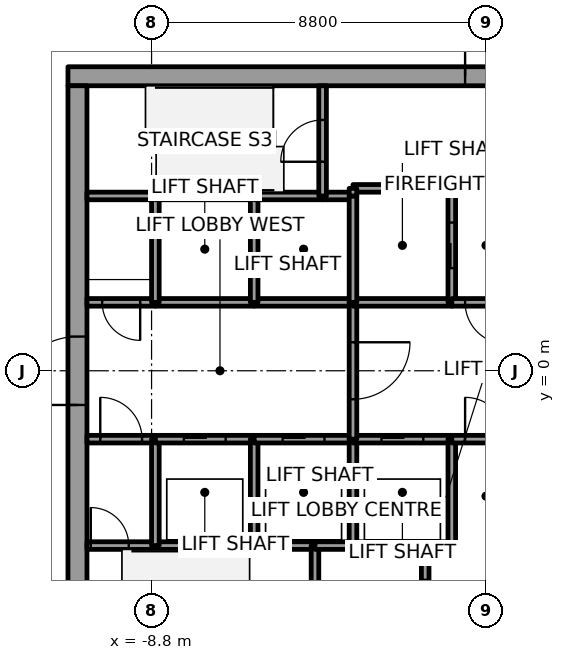
"""IFC4 building model, lengths in metres.
Left out: names, types, materials, properties, quantities, classifications, styles, units other than length and angle.
Written with IfcOpenShell. Run it as: python <this file> out.ifc"""

import sys

from ifc_helpers import new_model, si_unit, direction, frame, frame_2d, origin, place, context, subcontext, project, spatial, rectangle, extrude, element, fill, save


model = new_model("IFC4")
c1 = context("Model", 3, precision=1e-05, world=origin(), true_north=direction((0.0, 1.0)))
c2 = subcontext(c1, "Body", "Model", "MODEL_VIEW")
j1 = project(units=[si_unit("LENGTHUNIT", "METRE"), si_unit("PLANEANGLEUNIT", "RADIAN")], contexts=[c1])
p1 = place(None, origin())
s1 = spatial("IfcSite", under=j1, at=p1, CompositionType="ELEMENT")
p2 = place(p1, origin())
s2 = spatial("IfcBuilding", under=s1, at=p2, CompositionType="ELEMENT")
p3 = place(p2, frame((0.0, 0.0, 173.8)))
s3 = spatial("IfcBuildingStorey", under=s2, at=p3, CompositionType="ELEMENT", Elevation=173.8)
p4 = place(p3, frame((-11.0, 7.75, 0.0), z_axis=(0.0, 0.0, 1.0), x_axis=(1.0, 0.0, 0.0)))
e1 = element("IfcWall", 1, at=p4, inside=s3, PredefinedType="SHEAR", context=c2, shape_type="SweptSolid", body=[
    extrude(rectangle(XDim=22.0, YDim=0.5, at=frame_2d((11.0, 0.0))), origin(), (0.0, 0.0, 1.0), 4.0),
])
p5 = place(p4, frame((10.45, 0.0, 0.0)))
e2 = element("IfcOpeningElement", 2, at=p5, cuts=e1, PredefinedType="OPENING", context=c2, shape_type="SweptSolid", body=[
    extrude(rectangle(XDim=1.1, YDim=2.1, at=frame_2d((0.55, 1.05))), frame((0.0, 0.25, 0.0), z_axis=(0.0, -1.0, 0.0), x_axis=(1.0, 0.0, 0.0)), (0.0, 0.0, 1.0), 0.5),
])
p6 = place(p3, frame((-10.75, -7.5, 0.0), z_axis=(0.0, 0.0, 1.0), x_axis=(0.0, 1.0, 0.0)))
e3 = element("IfcWall", 3, at=p6, inside=s3, PredefinedType="SHEAR", context=c2, shape_type="SweptSolid", body=[
    extrude(rectangle(XDim=15.0, YDim=0.5, at=frame_2d((7.5, 0.0))), origin(), (0.0, 0.0, 1.0), 4.0),
])
p7 = place(p6, frame((6.6, 0.0, 0.0)))
e4 = element("IfcOpeningElement", 4, at=p7, cuts=e3, PredefinedType="OPENING", context=c2, shape_type="SweptSolid", body=[
    extrude(rectangle(XDim=1.8, YDim=2.1, at=frame_2d((0.9, 1.05))), frame((0.0, 0.25, 0.0), z_axis=(0.0, -1.0, 0.0), x_axis=(1.0, 0.0, 0.0)), (0.0, 0.0, 1.0), 0.5),
])
p8 = place(p3, frame((-10.5, -4.6, 0.0), z_axis=(0.0, 0.0, 1.0), x_axis=(1.0, 0.0, 0.0)))
e5 = element("IfcWall", 5, at=p8, inside=s3, PredefinedType="SOLIDWALL", context=c2, shape_type="SweptSolid", body=[
    extrude(rectangle(XDim=1.8, YDim=0.2, at=frame_2d((0.9, 0.0))), origin(), (0.0, 0.0, 1.0), 3.85),
])
p9 = place(p8, frame((0.1, 0.0, 0.0)))
e6 = element("IfcOpeningElement", 6, at=p9, cuts=e5, PredefinedType="OPENING", context=c2, shape_type="SweptSolid", body=[
    extrude(rectangle(XDim=1.0, YDim=2.1, at=frame_2d((0.5, 1.05))), frame((0.0, 0.1, 0.0), z_axis=(0.0, -1.0, 0.0), x_axis=(1.0, 0.0, 0.0)), (0.0, 0.0, 1.0), 0.2),
])
p10 = place(p3, frame((-10.5, -1.8, 0.0), z_axis=(0.0, 0.0, 1.0), x_axis=(1.0, 0.0, 0.0)))
e7 = element("IfcWall", 7, at=p10, inside=s3, PredefinedType="SOLIDWALL", context=c2, shape_type="SweptSolid", body=[
    extrude(rectangle(XDim=1.8, YDim=0.2, at=frame_2d((0.9, 0.0))), origin(), (0.0, 0.0, 1.0), 3.85),
])
p11 = place(p10, frame((0.35, 0.0, 0.0)))
e8 = element("IfcOpeningElement", 8, at=p11, cuts=e7, PredefinedType="OPENING", context=c2, shape_type="SweptSolid", body=[
    extrude(rectangle(XDim=1.1, YDim=2.1, at=frame_2d((0.55, 1.05))), frame((0.0, 0.1, 0.0), z_axis=(0.0, -1.0, 0.0), x_axis=(1.0, 0.0, 0.0)), (0.0, 0.0, 1.0), 0.2),
])
p12 = place(p3, frame((-8.7, 1.8, 0.0), z_axis=(0.0, 0.0, 1.0), x_axis=(-1.0, 0.0, 0.0)))
e9 = element("IfcWall", 9, at=p12, inside=s3, PredefinedType="SOLIDWALL", context=c2, shape_type="SweptSolid", body=[
    extrude(rectangle(XDim=1.8, YDim=0.2, at=frame_2d((0.9, 0.0))), origin(), (0.0, 0.0, 1.0), 3.85),
])
p13 = place(p12, frame((0.4, 0.0, 0.0)))
e10 = element("IfcOpeningElement", 10, at=p13, cuts=e9, PredefinedType="OPENING", context=c2, shape_type="SweptSolid", body=[
    extrude(rectangle(XDim=1.0, YDim=2.1, at=frame_2d((0.5, 1.05))), frame((0.0, 0.1, 0.0), z_axis=(0.0, -1.0, 0.0), x_axis=(1.0, 0.0, 0.0)), (0.0, 0.0, 1.0), 0.2),
])
p14 = place(p3, frame((-8.7, 4.6, 0.0), z_axis=(0.0, 0.0, 1.0), x_axis=(-1.0, 0.0, 0.0)))
e11 = element("IfcWall", 11, at=p14, inside=s3, PredefinedType="SOLIDWALL", context=c2, shape_type="SweptSolid", body=[
    extrude(rectangle(XDim=1.8, YDim=0.2, at=frame_2d((0.9, 0.0))), origin(), (0.0, 0.0, 1.0), 3.85),
])
p15 = place(p3, frame((-8.7, -4.6, 0.0), z_axis=(0.0, 0.0, 1.0), x_axis=(1.0, 0.0, 0.0)))
e12 = element("IfcWall", 12, at=p15, inside=s3, PredefinedType="SOLIDWALL", context=c2, shape_type="SweptSolid", body=[
    extrude(rectangle(XDim=2.6, YDim=0.2, at=frame_2d((1.3, 0.0))), origin(), (0.0, 0.0, 1.0), 3.85),
])
p16 = place(p3, frame((-8.7, -4.6, 0.0), z_axis=(0.0, 0.0, 1.0), x_axis=(0.0, 1.0, 0.0)))
e13 = element("IfcWall", 13, at=p16, inside=s3, PredefinedType="SOLIDWALL", context=c2, shape_type="SweptSolid", body=[
    extrude(rectangle(XDim=2.8, YDim=0.2, at=frame_2d((1.4, 0.0))), origin(), (0.0, 0.0, 1.0), 3.85),
])
p17 = place(p3, frame((-8.7, -1.8, 0.0), z_axis=(0.0, 0.0, 1.0), x_axis=(1.0, 0.0, 0.0)))
e14 = element("IfcWall", 14, at=p17, inside=s3, PredefinedType="SOLIDWALL", context=c2, shape_type="SweptSolid", body=[
    extrude(rectangle(XDim=2.6, YDim=0.2, at=frame_2d((1.3, 0.0))), origin(), (0.0, 0.0, 1.0), 3.85),
])
p18 = place(p17, frame((0.75, 0.0, 0.0)))
e15 = element("IfcOpeningElement", 15, at=p18, cuts=e14, PredefinedType="OPENING", context=c2, shape_type="SweptSolid", body=[
    extrude(rectangle(XDim=1.1, YDim=2.1, at=frame_2d((0.55, 1.05))), frame((0.0, 0.1, 0.0), z_axis=(0.0, -1.0, 0.0), x_axis=(1.0, 0.0, 0.0)), (0.0, 0.0, 1.0), 0.2),
])
p19 = place(p3, frame((-6.1, 1.8, 0.0), z_axis=(0.0, 0.0, 1.0), x_axis=(-1.0, 0.0, 0.0)))
e16 = element("IfcWall", 16, at=p19, inside=s3, PredefinedType="SOLIDWALL", context=c2, shape_type="SweptSolid", body=[
    extrude(rectangle(XDim=2.6, YDim=0.2, at=frame_2d((1.3, 0.0))), origin(), (0.0, 0.0, 1.0), 3.85),
])
p20 = place(p3, frame((-8.7, 1.8, 0.0), z_axis=(0.0, 0.0, 1.0), x_axis=(0.0, 1.0, 0.0)))
e17 = element("IfcWall", 17, at=p20, inside=s3, PredefinedType="SOLIDWALL", context=c2, shape_type="SweptSolid", body=[
    extrude(rectangle(XDim=2.8, YDim=0.2, at=frame_2d((1.4, 0.0))), origin(), (0.0, 0.0, 1.0), 3.85),
])
p21 = place(p3, frame((-6.1, 4.6, 0.0), z_axis=(0.0, 0.0, 1.0), x_axis=(-1.0, 0.0, 0.0)))
e18 = element("IfcWall", 18, at=p21, inside=s3, PredefinedType="SOLIDWALL", context=c2, shape_type="SweptSolid", body=[
    extrude(rectangle(XDim=2.6, YDim=0.2, at=frame_2d((1.3, 0.0))), origin(), (0.0, 0.0, 1.0), 3.85),
])
p22 = place(p3, frame((-6.1, -4.6, 0.0), z_axis=(0.0, 0.0, 1.0), x_axis=(1.0, 0.0, 0.0)))
e19 = element("IfcWall", 19, at=p22, inside=s3, PredefinedType="SOLIDWALL", context=c2, shape_type="SweptSolid", body=[
    extrude(rectangle(XDim=1.6, YDim=0.2, at=frame_2d((0.8, 0.0))), origin(), (0.0, 0.0, 1.0), 3.85),
])
p23 = place(p3, frame((-6.1, -4.6, 0.0), z_axis=(0.0, 0.0, 1.0), x_axis=(0.0, 1.0, 0.0)))
e20 = element("IfcWall", 20, at=p23, inside=s3, PredefinedType="SOLIDWALL", context=c2, shape_type="SweptSolid", body=[
    extrude(rectangle(XDim=2.8, YDim=0.2, at=frame_2d((1.4, 0.0))), origin(), (0.0, 0.0, 1.0), 3.85),
])
p24 = place(p3, frame((-6.1, -1.8, 0.0), z_axis=(0.0, 0.0, 1.0), x_axis=(1.0, 0.0, 0.0)))
e21 = element("IfcWall", 21, at=p24, inside=s3, PredefinedType="SOLIDWALL", context=c2, shape_type="SweptSolid", body=[
    extrude(rectangle(XDim=2.6, YDim=0.2, at=frame_2d((1.3, 0.0))), origin(), (0.0, 0.0, 1.0), 3.85),
])
p25 = place(p24, frame((0.75, 0.0, 0.0)))
e22 = element("IfcOpeningElement", 22, at=p25, cuts=e21, PredefinedType="OPENING", context=c2, shape_type="SweptSolid", body=[
    extrude(rectangle(XDim=1.1, YDim=2.1, at=frame_2d((0.55, 1.05))), frame((0.0, 0.1, 0.0), z_axis=(0.0, -1.0, 0.0), x_axis=(1.0, 0.0, 0.0)), (0.0, 0.0, 1.0), 0.2),
])
p26 = place(p3, frame((-3.5, 1.8, 0.0), z_axis=(0.0, 0.0, 1.0), x_axis=(-1.0, 0.0, 0.0)))
e23 = element("IfcWall", 23, at=p26, inside=s3, PredefinedType="SOLIDWALL", context=c2, shape_type="SweptSolid", body=[
    extrude(rectangle(XDim=2.6, YDim=0.2, at=frame_2d((1.3, 0.0))), origin(), (0.0, 0.0, 1.0), 3.85),
])
p27 = place(p3, frame((-6.1, 1.8, 0.0), z_axis=(0.0, 0.0, 1.0), x_axis=(0.0, 1.0, 0.0)))
e24 = element("IfcWall", 24, at=p27, inside=s3, PredefinedType="SOLIDWALL", context=c2, shape_type="SweptSolid", body=[
    extrude(rectangle(XDim=2.8, YDim=0.2, at=frame_2d((1.4, 0.0))), origin(), (0.0, 0.0, 1.0), 3.85),
])
p28 = place(p3, frame((-4.3, 4.6, 0.0), z_axis=(0.0, 0.0, 1.0), x_axis=(-1.0, 0.0, 0.0)))
e25 = element("IfcWall", 25, at=p28, inside=s3, PredefinedType="SOLIDWALL", context=c2, shape_type="SweptSolid", body=[
    extrude(rectangle(XDim=1.8, YDim=0.2, at=frame_2d((0.9, 0.0))), origin(), (0.0, 0.0, 1.0), 3.85),
])
p29 = place(p3, frame((-4.5, -4.6, 0.0), z_axis=(0.0, 0.0, 1.0), x_axis=(0.0, -1.0, 0.0)))
e26 = element("IfcWall", 26, at=p29, inside=s3, PredefinedType="SOLIDWALL", context=c2, shape_type="SweptSolid", body=[
    extrude(rectangle(XDim=2.9, YDim=0.2, at=frame_2d((1.45, 0.0))), origin(), (0.0, 0.0, 1.0), 3.85),
])
p30 = place(p3, frame((-4.5, -4.6, 0.0), z_axis=(0.0, 0.0, 1.0), x_axis=(1.0, 0.0, 0.0)))
e27 = element("IfcWall", 27, at=p30, inside=s3, PredefinedType="SOLIDWALL", context=c2, shape_type="SweptSolid", body=[
    extrude(rectangle(XDim=1.0, YDim=0.2, at=frame_2d((0.5, 0.0))), origin(), (0.0, 0.0, 1.0), 3.85),
])
p31 = place(p3, frame((-3.5, 4.6, 0.0), z_axis=(0.0, 0.0, 1.0), x_axis=(-1.0, 0.0, 0.0)))
e28 = element("IfcWall", 28, at=p31, inside=s3, PredefinedType="SOLIDWALL", context=c2, shape_type="SweptSolid", body=[
    extrude(rectangle(XDim=0.8, YDim=0.2, at=frame_2d((0.4, 0.0))), origin(), (0.0, 0.0, 1.0), 3.85),
])
p32 = place(p3, frame((-4.3, 4.6, 0.0), z_axis=(0.0, 0.0, 1.0), x_axis=(0.0, 1.0, 0.0)))
e29 = element("IfcWall", 29, at=p32, inside=s3, PredefinedType="SOLIDWALL", context=c2, shape_type="SweptSolid", body=[
    extrude(rectangle(XDim=2.9, YDim=0.2, at=frame_2d((1.45, 0.0))), origin(), (0.0, 0.0, 1.0), 3.85),
])
p33 = place(p32, frame((0.9, 0.0, 0.0)))
e30 = element("IfcOpeningElement", 30, at=p33, cuts=e29, PredefinedType="OPENING", context=c2, shape_type="SweptSolid", body=[
    extrude(rectangle(XDim=1.1, YDim=2.1, at=frame_2d((0.55, 1.05))), frame((0.0, 0.1, 0.0), z_axis=(0.0, -1.0, 0.0), x_axis=(1.0, 0.0, 0.0)), (0.0, 0.0, 1.0), 0.2),
])
p34 = place(p3, frame((-3.5, -4.6, 0.0), z_axis=(0.0, 0.0, 1.0), x_axis=(1.0, 0.0, 0.0)))
e31 = element("IfcWall", 31, at=p34, inside=s3, PredefinedType="SOLIDWALL", context=c2, shape_type="SweptSolid", body=[
    extrude(rectangle(XDim=1.9, YDim=0.2, at=frame_2d((0.95, 0.0))), origin(), (0.0, 0.0, 1.0), 3.85),
])
p35 = place(p3, frame((-3.5, -4.6, 0.0), z_axis=(0.0, 0.0, 1.0), x_axis=(0.0, 1.0, 0.0)))
e32 = element("IfcWall", 32, at=p35, inside=s3, PredefinedType="SOLIDWALL", context=c2, shape_type="SweptSolid", body=[
    extrude(rectangle(XDim=2.8, YDim=0.2, at=frame_2d((1.4, 0.0))), origin(), (0.0, 0.0, 1.0), 3.85),
])
p36 = place(p3, frame((-3.5, -1.8, 0.0), z_axis=(0.0, 0.0, 1.0), x_axis=(1.0, 0.0, 0.0)))
e33 = element("IfcWall", 33, at=p36, inside=s3, PredefinedType="SOLIDWALL", context=c2, shape_type="SweptSolid", body=[
    extrude(rectangle(XDim=2.6, YDim=0.2, at=frame_2d((1.3, 0.0))), origin(), (0.0, 0.0, 1.0), 3.85),
])
p37 = place(p36, frame((0.75, 0.0, 0.0)))
e34 = element("IfcOpeningElement", 34, at=p37, cuts=e33, PredefinedType="OPENING", context=c2, shape_type="SweptSolid", body=[
    extrude(rectangle(XDim=1.1, YDim=2.1, at=frame_2d((0.55, 1.05))), frame((0.0, 0.1, 0.0), z_axis=(0.0, -1.0, 0.0), x_axis=(1.0, 0.0, 0.0)), (0.0, 0.0, 1.0), 0.2),
])
p38 = place(p3, frame((-3.5, 1.8, 0.0), z_axis=(0.0, 0.0, 1.0), x_axis=(0.0, -1.0, 0.0)))
e35 = element("IfcWall", 35, at=p38, inside=s3, PredefinedType="SOLIDWALL", context=c2, shape_type="SweptSolid", body=[
    extrude(rectangle(XDim=3.6, YDim=0.2, at=frame_2d((1.8, 0.0))), origin(), (0.0, 0.0, 1.0), 3.85),
])
p39 = place(p38, frame((1.05, 0.0, 0.0)))
e36 = element("IfcOpeningElement", 36, at=p39, cuts=e35, PredefinedType="OPENING", context=c2, shape_type="SweptSolid", body=[
    extrude(rectangle(XDim=1.5, YDim=2.1, at=frame_2d((0.75, 1.05))), frame((0.0, 0.1, 0.0), z_axis=(0.0, -1.0, 0.0), x_axis=(1.0, 0.0, 0.0)), (0.0, 0.0, 1.0), 0.2),
])
p40 = place(p3, frame((-0.9, 1.8, 0.0), z_axis=(0.0, 0.0, 1.0), x_axis=(-1.0, 0.0, 0.0)))
e37 = element("IfcWall", 37, at=p40, inside=s3, PredefinedType="SOLIDWALL", context=c2, shape_type="SweptSolid", body=[
    extrude(rectangle(XDim=2.6, YDim=0.2, at=frame_2d((1.3, 0.0))), origin(), (0.0, 0.0, 1.0), 3.85),
])
p41 = place(p3, frame((-3.5, 4.6, 0.0), z_axis=(0.0, 0.0, 1.0), x_axis=(0.0, -1.0, 0.0)))
e38 = element("IfcWall", 38, at=p41, inside=s3, PredefinedType="SOLIDWALL", context=c2, shape_type="SweptSolid", body=[
    extrude(rectangle(XDim=2.8, YDim=0.2, at=frame_2d((1.4, 0.0))), origin(), (0.0, 0.0, 1.0), 3.85),
])
p42 = place(p3, frame((-0.9, 1.8, 0.0), z_axis=(0.0, 0.0, 1.0), x_axis=(0.0, 1.0, 0.0)))
e39 = element("IfcWall", 39, at=p42, inside=s3, PredefinedType="SOLIDWALL", context=c2, shape_type="SweptSolid", body=[
    extrude(rectangle(XDim=3.0, YDim=0.2, at=frame_2d((1.5, 0.0))), origin(), (0.0, 0.0, 1.0), 3.85),
])
p43 = place(p42, frame((0.9, 0.0, 0.0)))
e40 = element("IfcOpeningElement", 40, at=p43, cuts=e39, PredefinedType="OPENING", context=c2, shape_type="SweptSolid", body=[
    extrude(rectangle(XDim=1.2, YDim=2.1, at=frame_2d((0.6, 1.05))), frame((0.0, 0.1, 0.0), z_axis=(0.0, -1.0, 0.0), x_axis=(1.0, 0.0, 0.0)), (0.0, 0.0, 1.0), 0.2),
])
p44 = place(p3, frame((-0.9, 4.8, 0.0), z_axis=(0.0, 0.0, 1.0), x_axis=(-1.0, 0.0, 0.0)))
e41 = element("IfcWall", 41, at=p44, inside=s3, PredefinedType="SOLIDWALL", context=c2, shape_type="SweptSolid", body=[
    extrude(rectangle(XDim=2.6, YDim=0.2, at=frame_2d((1.3, 0.0))), origin(), (0.0, 0.0, 1.0), 3.85),
])
p45 = place(p3, frame((-3.5, 4.8, 0.0), z_axis=(0.0, 0.0, 1.0), x_axis=(0.0, -1.0, 0.0)))
e42 = element("IfcWall", 42, at=p45, inside=s3, PredefinedType="SOLIDWALL", context=c2, shape_type="SweptSolid", body=[
    extrude(rectangle(XDim=0.2, YDim=0.2, at=frame_2d((0.1, 0.0))), origin(), (0.0, 0.0, 1.0), 3.85),
])
p46 = place(p3, frame((-1.6, -7.5, 0.0), z_axis=(0.0, 0.0, 1.0), x_axis=(0.0, 1.0, 0.0)))
e43 = element("IfcWall", 43, at=p46, inside=s3, PredefinedType="SOLIDWALL", context=c2, shape_type="SweptSolid", body=[
    extrude(rectangle(XDim=2.9, YDim=0.2, at=frame_2d((1.45, 0.0))), origin(), (0.0, 0.0, 1.0), 3.85),
])
p47 = place(p46, frame((0.9, 0.0, 0.0)))
e44 = element("IfcOpeningElement", 44, at=p47, cuts=e43, PredefinedType="OPENING", context=c2, shape_type="SweptSolid", body=[
    extrude(rectangle(XDim=1.1, YDim=2.1, at=frame_2d((0.55, 1.05))), frame((0.0, 0.1, 0.0), z_axis=(0.0, -1.0, 0.0), x_axis=(1.0, 0.0, 0.0)), (0.0, 0.0, 1.0), 0.2),
])
p48 = place(p3, frame((-1.6, -4.6, 0.0), z_axis=(0.0, 0.0, 1.0), x_axis=(1.0, 0.0, 0.0)))
e45 = element("IfcWall", 45, at=p48, inside=s3, PredefinedType="SOLIDWALL", context=c2, shape_type="SweptSolid", body=[
    extrude(rectangle(XDim=0.7, YDim=0.2, at=frame_2d((0.35, 0.0))), origin(), (0.0, 0.0, 1.0), 3.85),
])
p49 = place(p3, frame((-0.9, -4.6, 0.0), z_axis=(0.0, 0.0, 1.0), x_axis=(0.0, 1.0, 0.0)))
e46 = element("IfcWall", 46, at=p49, inside=s3, PredefinedType="SOLIDWALL", context=c2, shape_type="SweptSolid", body=[
    extrude(rectangle(XDim=2.8, YDim=0.2, at=frame_2d((1.4, 0.0))), origin(), (0.0, 0.0, 1.0), 3.85),
])
p50 = place(p3, frame((-0.9, -1.8, 0.0), z_axis=(0.0, 0.0, 1.0), x_axis=(1.0, 0.0, 0.0)))
e47 = element("IfcWall", 47, at=p50, inside=s3, PredefinedType="SOLIDWALL", context=c2, shape_type="SweptSolid", body=[
    extrude(rectangle(XDim=1.8, YDim=0.2, at=frame_2d((0.9, 0.0))), origin(), (0.0, 0.0, 1.0), 3.85),
])
p51 = place(p50, frame((0.35, 0.0, 0.0)))
e48 = element("IfcOpeningElement", 48, at=p51, cuts=e47, PredefinedType="OPENING", context=c2, shape_type="SweptSolid", body=[
    extrude(rectangle(XDim=1.1, YDim=2.1, at=frame_2d((0.55, 1.05))), frame((0.0, 0.1, 0.0), z_axis=(0.0, -1.0, 0.0), x_axis=(1.0, 0.0, 0.0)), (0.0, 0.0, 1.0), 0.2),
])
p52 = place(p3, frame((0.9, 1.8, 0.0), z_axis=(0.0, 0.0, 1.0), x_axis=(-1.0, 0.0, 0.0)))
e49 = element("IfcWall", 49, at=p52, inside=s3, PredefinedType="SOLIDWALL", context=c2, shape_type="SweptSolid", body=[
    extrude(rectangle(XDim=1.8, YDim=0.2, at=frame_2d((0.9, 0.0))), origin(), (0.0, 0.0, 1.0), 3.85),
])
p53 = place(p52, frame((0.35, 0.0, 0.0)))
e50 = element("IfcOpeningElement", 50, at=p53, cuts=e49, PredefinedType="OPENING", context=c2, shape_type="SweptSolid", body=[
    extrude(rectangle(XDim=1.1, YDim=2.1, at=frame_2d((0.55, 1.05))), frame((0.0, 0.1, 0.0), z_axis=(0.0, -1.0, 0.0), x_axis=(1.0, 0.0, 0.0)), (0.0, 0.0, 1.0), 0.2),
])
p54 = place(p18, origin())
e51 = element("IfcDoor", 51, at=p54, inside=s3, OperationType="SLIDING_TO_LEFT", PredefinedType="DOOR", context=c2, shape_type="SweptSolid", body=[
    extrude(rectangle(XDim=1.1, YDim=2.1, at=frame_2d((0.55, 1.05))), frame((0.0, 0.025, 0.0), z_axis=(0.0, -1.0, 0.0), x_axis=(1.0, 0.0, 0.0)), (0.0, 0.0, 1.0), 0.05),
])
fill(e15, e51)
p55 = place(p25, origin())
e52 = element("IfcDoor", 52, at=p55, inside=s3, OperationType="SLIDING_TO_RIGHT", PredefinedType="DOOR", context=c2, shape_type="SweptSolid", body=[
    extrude(rectangle(XDim=1.1, YDim=2.1, at=frame_2d((0.55, 1.05))), frame((0.0, 0.025, 0.0), z_axis=(0.0, -1.0, 0.0), x_axis=(1.0, 0.0, 0.0)), (0.0, 0.0, 1.0), 0.05),
])
fill(e22, e52)
p56 = place(p37, origin())
e53 = element("IfcDoor", 53, at=p56, inside=s3, OperationType="SLIDING_TO_LEFT", PredefinedType="DOOR", context=c2, shape_type="SweptSolid", body=[
    extrude(rectangle(XDim=1.1, YDim=2.1, at=frame_2d((0.55, 1.05))), frame((0.0, 0.025, 0.0), z_axis=(0.0, -1.0, 0.0), x_axis=(1.0, 0.0, 0.0)), (0.0, 0.0, 1.0), 0.05),
])
fill(e34, e53)
p57 = place(p43, origin())
e54 = element("IfcDoor", 54, at=p57, inside=s3, OperationType="SLIDING_TO_LEFT", PredefinedType="DOOR", context=c2, shape_type="SweptSolid", body=[
    extrude(rectangle(XDim=1.2, YDim=2.1, at=frame_2d((0.6, 1.05))), frame((0.0, 0.025, 0.0), z_axis=(0.0, -1.0, 0.0), x_axis=(1.0, 0.0, 0.0)), (0.0, 0.0, 1.0), 0.05),
])
fill(e40, e54)
p58 = place(p39, origin())
e55 = element("IfcDoor", 55, at=p58, inside=s3, OperationType="DOUBLE_DOOR_SINGLE_SWING", PredefinedType="DOOR", context=c2, shape_type="SweptSolid", body=[
    extrude(rectangle(XDim=1.5, YDim=2.1, at=frame_2d((0.75, 1.05))), frame((0.0, 0.025, 0.0), z_axis=(0.0, -1.0, 0.0), x_axis=(1.0, 0.0, 0.0)), (0.0, 0.0, 1.0), 0.05),
])
fill(e36, e55)
p59 = place(p11, origin())
e56 = element("IfcDoor", 56, at=p59, inside=s3, OperationType="SINGLE_SWING_RIGHT", PredefinedType="DOOR", context=c2, shape_type="SweptSolid", body=[
    extrude(rectangle(XDim=1.1, YDim=2.1, at=frame_2d((0.55, 1.05))), frame((0.0, 0.025, 0.0), z_axis=(0.0, -1.0, 0.0), x_axis=(1.0, 0.0, 0.0)), (0.0, 0.0, 1.0), 0.05),
])
fill(e8, e56)
p60 = place(p53, origin())
e57 = element("IfcDoor", 57, at=p60, inside=s3, OperationType="SINGLE_SWING_RIGHT", PredefinedType="DOOR", context=c2, shape_type="SweptSolid", body=[
    extrude(rectangle(XDim=1.1, YDim=2.1, at=frame_2d((0.55, 1.05))), frame((0.0, 0.025, 0.0), z_axis=(0.0, -1.0, 0.0), x_axis=(1.0, 0.0, 0.0)), (0.0, 0.0, 1.0), 0.05),
])
fill(e50, e57)
p61 = place(p51, origin())
e58 = element("IfcDoor", 58, at=p61, inside=s3, OperationType="SINGLE_SWING_RIGHT", PredefinedType="DOOR", context=c2, shape_type="SweptSolid", body=[
    extrude(rectangle(XDim=1.1, YDim=2.1, at=frame_2d((0.55, 1.05))), frame((0.0, 0.025, 0.0), z_axis=(0.0, -1.0, 0.0), x_axis=(1.0, 0.0, 0.0)), (0.0, 0.0, 1.0), 0.05),
])
fill(e48, e58)
p62 = place(p13, origin())
e59 = element("IfcDoor", 59, at=p62, inside=s3, OperationType="SINGLE_SWING_RIGHT", PredefinedType="DOOR", context=c2, shape_type="SweptSolid", body=[
    extrude(rectangle(XDim=1.0, YDim=2.1, at=frame_2d((0.5, 1.05))), frame((0.0, 0.025, 0.0), z_axis=(0.0, -1.0, 0.0), x_axis=(1.0, 0.0, 0.0)), (0.0, 0.0, 1.0), 0.05),
])
fill(e10, e59)
p63 = place(p9, origin())
e60 = element("IfcDoor", 60, at=p63, inside=s3, OperationType="SINGLE_SWING_LEFT", PredefinedType="DOOR", context=c2, shape_type="SweptSolid", body=[
    extrude(rectangle(XDim=1.0, YDim=2.1, at=frame_2d((0.5, 1.05))), frame((0.0, 0.025, 0.0), z_axis=(0.0, -1.0, 0.0), x_axis=(1.0, 0.0, 0.0)), (0.0, 0.0, 1.0), 0.05),
])
fill(e6, e60)
p64 = place(p33, origin())
e61 = element("IfcDoor", 61, at=p64, inside=s3, OperationType="SINGLE_SWING_LEFT", PredefinedType="DOOR", context=c2, shape_type="SweptSolid", body=[
    extrude(rectangle(XDim=1.1, YDim=2.1, at=frame_2d((0.55, 1.05))), frame((0.0, 0.025, 0.0), z_axis=(0.0, -1.0, 0.0), x_axis=(1.0, 0.0, 0.0)), (0.0, 0.0, 1.0), 0.05),
])
fill(e30, e61)
p65 = place(p7, origin())
e62 = element("IfcDoor", 62, at=p65, inside=s3, OperationType="DOUBLE_DOOR_SINGLE_SWING", PredefinedType="DOOR", context=c2, shape_type="SweptSolid", body=[
    extrude(rectangle(XDim=1.8, YDim=2.1, at=frame_2d((0.9, 1.05))), frame((0.0, 0.025, 0.0), z_axis=(0.0, -1.0, 0.0), x_axis=(1.0, 0.0, 0.0)), (0.0, 0.0, 1.0), 0.05),
])
fill(e4, e62)
p66 = place(p5, origin())
e63 = element("IfcDoor", 63, at=p66, inside=s3, OperationType="SINGLE_SWING_RIGHT", PredefinedType="DOOR", context=c2, shape_type="SweptSolid", body=[
    extrude(rectangle(XDim=1.1, YDim=2.1, at=frame_2d((0.55, 1.05))), frame((0.0, 0.025, 0.0), z_axis=(0.0, -1.0, 0.0), x_axis=(1.0, 0.0, 0.0)), (0.0, 0.0, 1.0), 0.05),
])
fill(e2, e63)
save(model, sys.argv[1])
